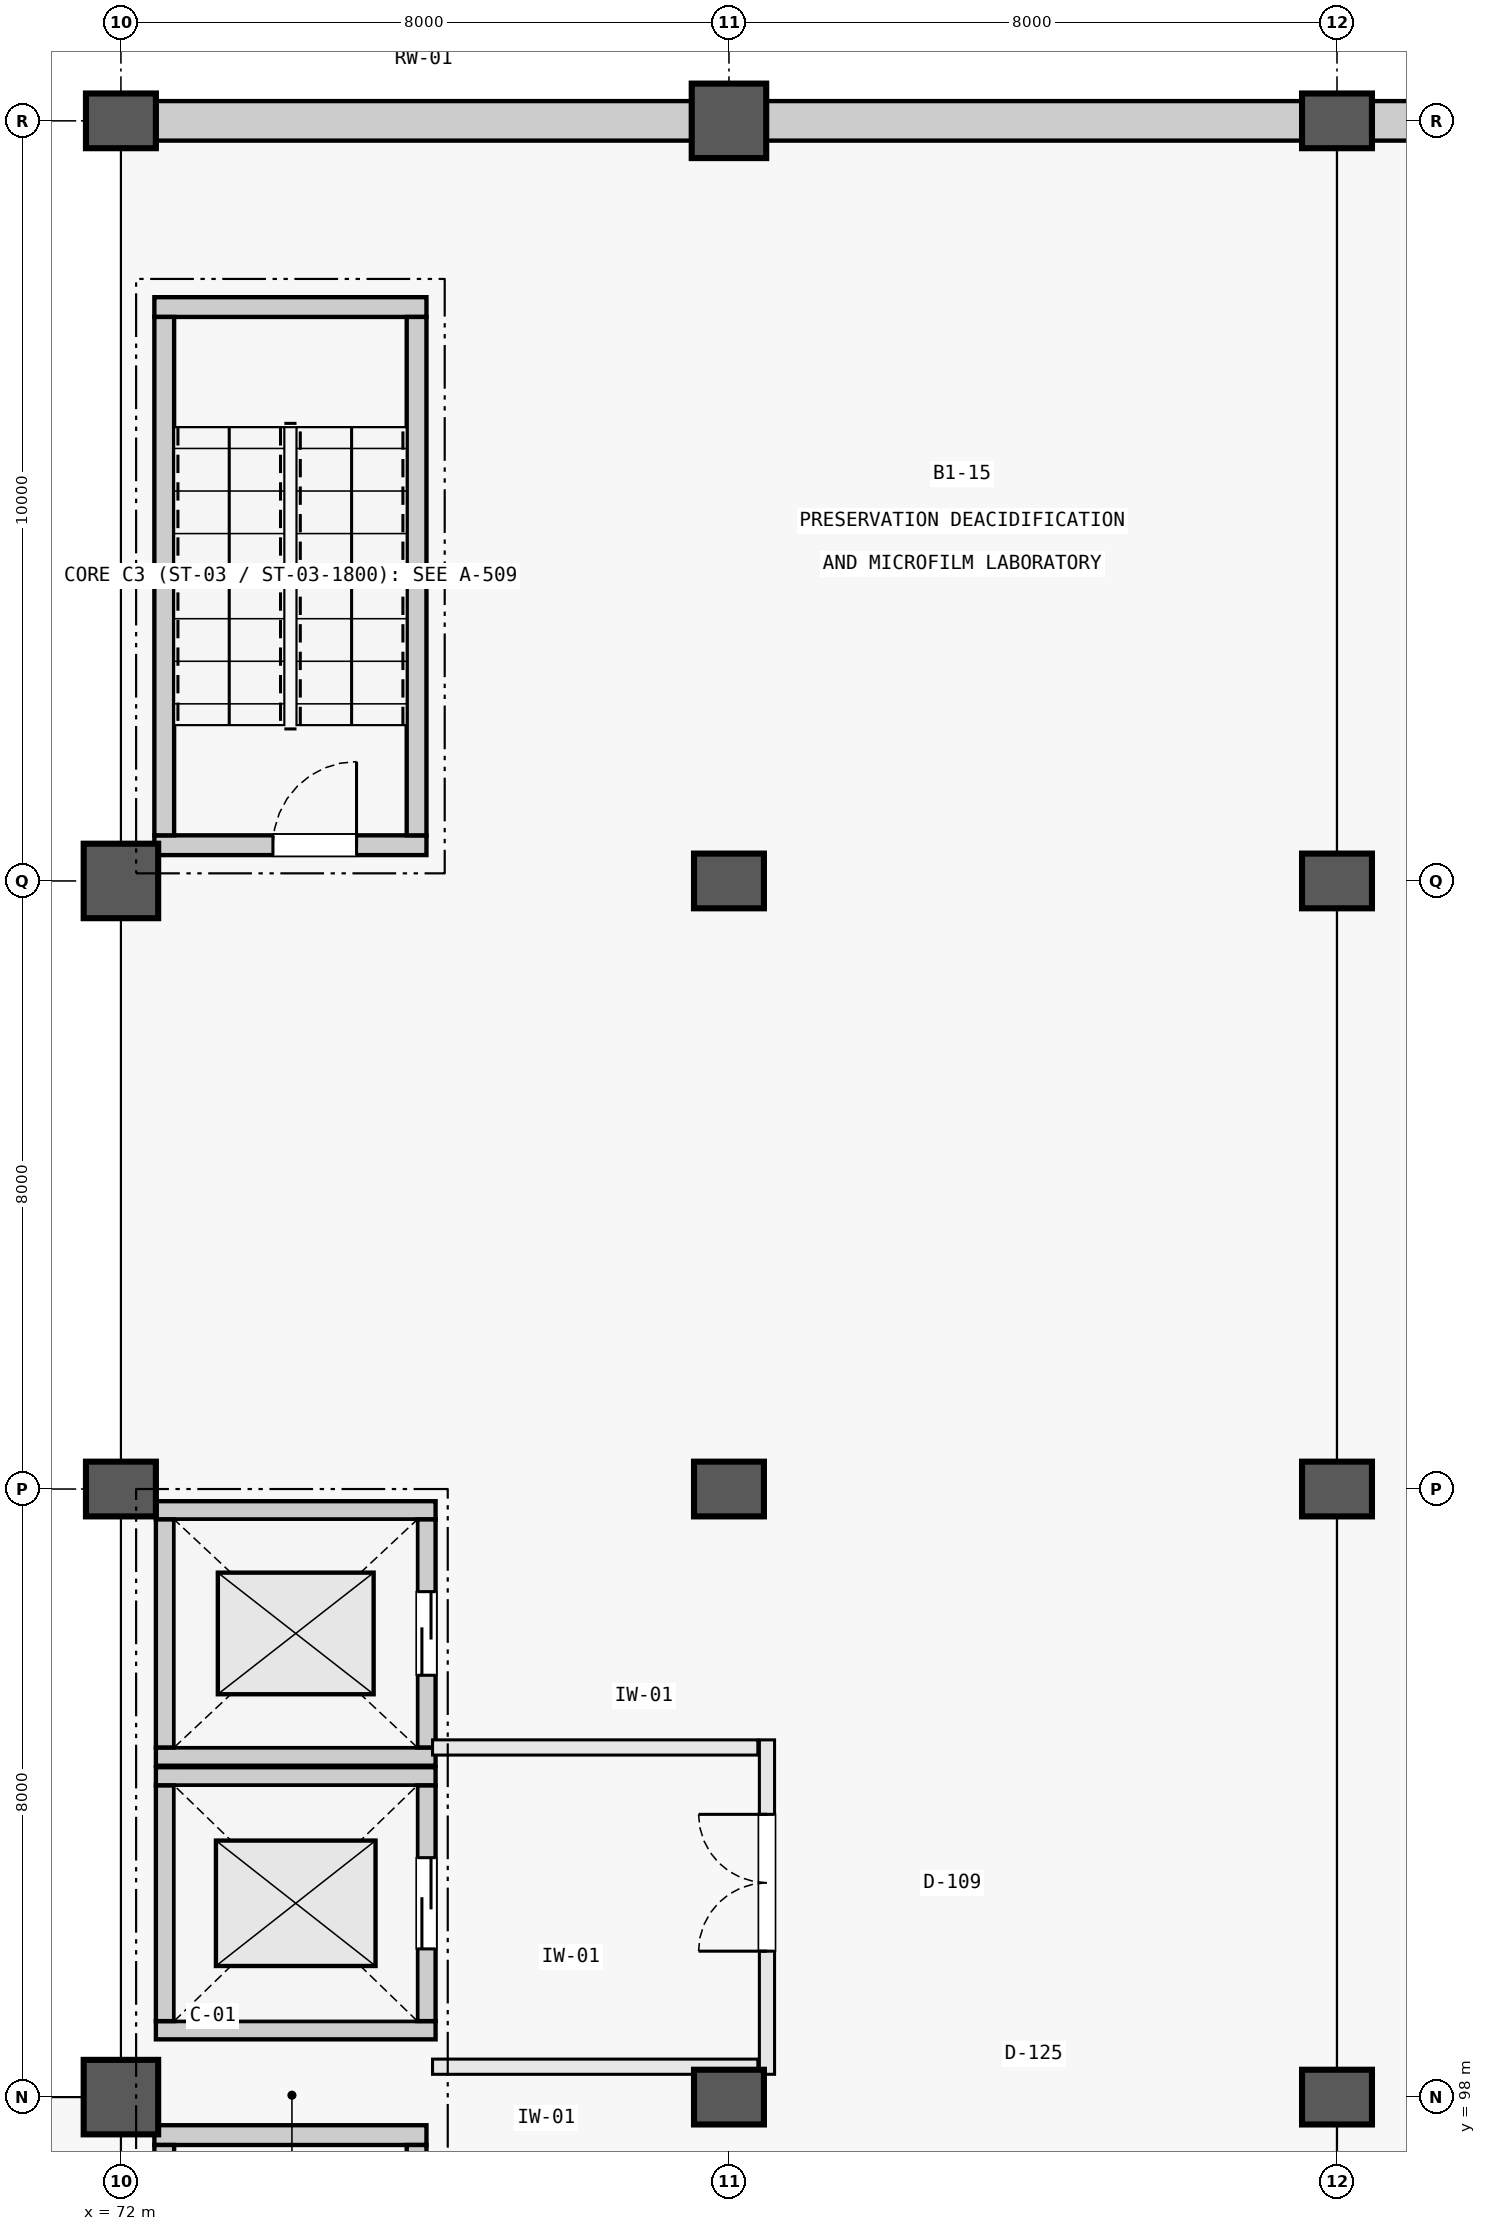
"""IFC4 building model, lengths in metres.
Left out: names, types, materials, properties, quantities, classifications, styles, units other than length and angle.
Written with IfcOpenShell. Run it as: python <this file> out.ifc"""

import sys

from ifc_helpers import new_model, si_unit, direction, frame, frame_2d, origin, origin_2d, place, context, subcontext, project, spatial, rectangle, extrude, element, fill, save


model = new_model("IFC4")
c1 = context("Model", 3, precision=1e-05, world=origin(), true_north=direction((0.0, 1.0)))
c2 = subcontext(c1, "Body", "Model", "MODEL_VIEW")
j1 = project(units=[si_unit("LENGTHUNIT", "METRE"), si_unit("PLANEANGLEUNIT", "RADIAN")], contexts=[c1])
p1 = place(None, origin())
s1 = spatial("IfcSite", under=j1, at=p1, CompositionType="ELEMENT")
p2 = place(p1, origin())
s2 = spatial("IfcBuilding", under=s1, at=p2, CompositionType="ELEMENT")
p3 = place(p2, frame((0.0, 0.0, -5.4)))
s3 = spatial("IfcBuildingStorey", under=s2, at=p3, CompositionType="ELEMENT", Elevation=-5.4)
p4 = place(p3, frame((72.0, 98.0, 0.0), z_axis=(0.0, 0.0, 1.0), x_axis=(1.0, 0.0, 0.0)))
e1 = element("IfcColumn", 1, at=p4, inside=s3, PredefinedType="COLUMN", context=c2, shape_type="SweptSolid", body=[
    extrude(rectangle(XDim=0.98, YDim=0.98, at=origin_2d()), origin(), (0.0, 0.0, 1.0), 5.4),
])
p5 = place(p3, frame((72.0, 106.0, 0.0), z_axis=(0.0, 0.0, 1.0), x_axis=(1.0, 0.0, 0.0)))
e2 = element("IfcColumn", 2, at=p5, inside=s3, PredefinedType="COLUMN", context=c2, shape_type="SweptSolid", body=[
    extrude(rectangle(XDim=0.92, YDim=0.72, at=origin_2d()), origin(), (0.0, 0.0, 1.0), 5.4),
])
p6 = place(p3, frame((72.0, 114.0, 0.0), z_axis=(0.0, 0.0, 1.0), x_axis=(1.0, 0.0, 0.0)))
e3 = element("IfcColumn", 3, at=p6, inside=s3, PredefinedType="COLUMN", context=c2, shape_type="SweptSolid", body=[
    extrude(rectangle(XDim=0.98, YDim=0.98, at=origin_2d()), origin(), (0.0, 0.0, 1.0), 5.4),
])
for number, where, z_axis, x_axis in (
    (4, (72.0, 124.0, 0.0), (0.0, 0.0, 1.0), (1.0, 0.0, 0.0)),
    (5, (80.0, 98.0, 0.0), (0.0, 0.0, 1.0), (1.0, 0.0, 0.0)),
    (6, (80.0, 106.0, 0.0), (0.0, 0.0, 1.0), (1.0, 0.0, 0.0)),
    (7, (80.0, 114.0, 0.0), (0.0, 0.0, 1.0), (1.0, 0.0, 0.0)),
):
    element("IfcColumn", number, at=place(p3, frame(where, z_axis=z_axis, x_axis=x_axis)), inside=s3, PredefinedType="COLUMN", context=c2, shape_type="SweptSolid", body=[
        extrude(rectangle(XDim=0.92, YDim=0.72, at=origin_2d()), origin(), (0.0, 0.0, 1.0), 5.4),
    ])
p7 = place(p3, frame((80.0, 124.0, 0.0), z_axis=(0.0, 0.0, 1.0), x_axis=(1.0, 0.0, 0.0)))
e8 = element("IfcColumn", 8, at=p7, inside=s3, PredefinedType="COLUMN", context=c2, shape_type="SweptSolid", body=[
    extrude(rectangle(XDim=0.98, YDim=0.98, at=origin_2d()), origin(), (0.0, 0.0, 1.0), 5.4),
])
for number, where, z_axis, x_axis in (
    (9, (88.0, 98.0, 0.0), (0.0, 0.0, 1.0), (1.0, 0.0, 0.0)),
    (10, (88.0, 106.0, 0.0), (0.0, 0.0, 1.0), (1.0, 0.0, 0.0)),
    (11, (88.0, 114.0, 0.0), (0.0, 0.0, 1.0), (1.0, 0.0, 0.0)),
    (12, (88.0, 124.0, 0.0), (0.0, 0.0, 1.0), (1.0, 0.0, 0.0)),
):
    element("IfcColumn", number, at=place(p3, frame(where, z_axis=z_axis, x_axis=x_axis)), inside=s3, PredefinedType="COLUMN", context=c2, shape_type="SweptSolid", body=[
        extrude(rectangle(XDim=0.92, YDim=0.72, at=origin_2d()), origin(), (0.0, 0.0, 1.0), 5.4),
    ])
for number, where, z_axis, x_axis in (
    (13, (72.46, 124.0, 0.0), (0.0, 0.0, 1.0), (1.0, 0.0, 0.0)),
    (14, (80.49, 124.0, 0.0), (0.0, 0.0, 1.0), (1.0, 0.0, 0.0)),
    (15, (88.46, 124.0, 0.0), (0.0, 0.0, 1.0), (1.0, 0.0, 0.0)),
):
    element("IfcWall", number, at=place(p3, frame(where, z_axis=z_axis, x_axis=x_axis)), inside=s3, PredefinedType="USERDEFINED", context=c2, shape_type="SweptSolid", body=[
        extrude(rectangle(XDim=7.05, YDim=0.52, at=frame_2d((3.525, 0.0))), origin(), (0.0, 0.0, 1.0), 4.98),
    ])
p8 = place(p3, frame((72.44, 97.5, 0.0), z_axis=(0.0, 0.0, 1.0), x_axis=(1.0, 0.0, 0.0)))
e16 = element("IfcWall", 16, at=p8, inside=s3, PredefinedType="SOLIDWALL", context=c2, shape_type="SweptSolid", body=[
    extrude(rectangle(XDim=3.58, YDim=0.26, at=frame_2d((1.79, 0.0))), origin(), (0.0, 0.0, 1.0), 5.4),
])
for number, where, z_axis, x_axis in (
    (17, (72.57, 90.55, 0.0), (0.0, 0.0, 1.0), (0.0, 1.0, 0.0)),
    (18, (75.89, 90.55, 0.0), (0.0, 0.0, 1.0), (0.0, 1.0, 0.0)),
):
    element("IfcWall", number, at=place(p3, frame(where, z_axis=z_axis, x_axis=x_axis)), inside=s3, PredefinedType="SOLIDWALL", context=c2, shape_type="SweptSolid", body=[
        extrude(rectangle(XDim=6.82, YDim=0.26, at=frame_2d((3.41, 0.0))), origin(), (0.0, 0.0, 1.0), 5.4),
    ])
p9 = place(p3, frame((72.44, 114.47, 0.0), z_axis=(0.0, 0.0, 1.0), x_axis=(1.0, 0.0, 0.0)))
e19 = element("IfcWall", 19, at=p9, inside=s3, PredefinedType="SOLIDWALL", context=c2, shape_type="SweptSolid", body=[
    extrude(rectangle(XDim=3.58, YDim=0.26, at=frame_2d((1.79, 0.0))), origin(), (0.0, 0.0, 1.0), 5.4),
])
p10 = place(p9, frame((1.56, 0.0, 0.0)))
e20 = element("IfcOpeningElement", 20, at=p10, cuts=e19, PredefinedType="OPENING", context=c2, shape_type="SweptSolid", body=[
    extrude(rectangle(XDim=1.1, YDim=2.2, at=frame_2d((0.55, 1.1))), frame((0.0, 0.142, 0.0), z_axis=(0.0, -1.0, 0.0), x_axis=(1.0, 0.0, 0.0)), (0.0, 0.0, 1.0), 0.284),
])
p11 = place(p3, frame((72.44, 121.55, 0.0), z_axis=(0.0, 0.0, 1.0), x_axis=(1.0, 0.0, 0.0)))
e21 = element("IfcWall", 21, at=p11, inside=s3, PredefinedType="SOLIDWALL", context=c2, shape_type="SweptSolid", body=[
    extrude(rectangle(XDim=3.58, YDim=0.26, at=frame_2d((1.79, 0.0))), origin(), (0.0, 0.0, 1.0), 5.4),
])
for number, where, z_axis, x_axis in (
    (22, (72.57, 114.6, 0.0), (0.0, 0.0, 1.0), (0.0, 1.0, 0.0)),
    (23, (75.89, 114.6, 0.0), (0.0, 0.0, 1.0), (0.0, 1.0, 0.0)),
):
    element("IfcWall", number, at=place(p3, frame(where, z_axis=z_axis, x_axis=x_axis)), inside=s3, PredefinedType="SOLIDWALL", context=c2, shape_type="SweptSolid", body=[
        extrude(rectangle(XDim=6.82, YDim=0.26, at=frame_2d((3.41, 0.0))), origin(), (0.0, 0.0, 1.0), 5.4),
    ])
for number, where, z_axis, x_axis in (
    (24, (72.46, 98.88, 0.0), (0.0, 0.0, 1.0), (1.0, 0.0, 0.0)),
    (25, (72.46, 102.22, 0.0), (0.0, 0.0, 1.0), (1.0, 0.0, 0.0)),
):
    element("IfcWall", number, at=place(p3, frame(where, z_axis=z_axis, x_axis=x_axis)), inside=s3, PredefinedType="SOLIDWALL", context=c2, shape_type="SweptSolid", body=[
        extrude(rectangle(XDim=3.68, YDim=0.24, at=frame_2d((1.84, 0.0))), origin(), (0.0, 0.0, 1.0), 5.4),
    ])
p12 = place(p3, frame((72.58, 99.0, 0.0), z_axis=(0.0, 0.0, 1.0), x_axis=(0.0, 1.0, 0.0)))
e26 = element("IfcWall", 26, at=p12, inside=s3, PredefinedType="SOLIDWALL", context=c2, shape_type="SweptSolid", body=[
    extrude(rectangle(XDim=3.1, YDim=0.24, at=frame_2d((1.55, 0.0))), origin(), (0.0, 0.0, 1.0), 5.4),
])
p13 = place(p3, frame((76.02, 99.0, 0.0), z_axis=(0.0, 0.0, 1.0), x_axis=(0.0, 1.0, 0.0)))
e27 = element("IfcWall", 27, at=p13, inside=s3, PredefinedType="SOLIDWALL", context=c2, shape_type="SweptSolid", body=[
    extrude(rectangle(XDim=3.1, YDim=0.24, at=frame_2d((1.55, 0.0))), origin(), (0.0, 0.0, 1.0), 5.4),
])
p14 = place(p13, frame((0.95, 0.0, 0.0)))
e28 = element("IfcOpeningElement", 28, at=p14, cuts=e27, PredefinedType="OPENING", context=c2, shape_type="SweptSolid", body=[
    extrude(rectangle(XDim=1.2, YDim=2.2, at=frame_2d((0.6, 1.1))), frame((0.0, 0.132, 0.0), z_axis=(0.0, -1.0, 0.0), x_axis=(1.0, 0.0, 0.0)), (0.0, 0.0, 1.0), 0.264),
])
for number, where, z_axis, x_axis in (
    (29, (72.46, 102.48, 0.0), (0.0, 0.0, 1.0), (1.0, 0.0, 0.0)),
    (30, (72.46, 105.72, 0.0), (0.0, 0.0, 1.0), (1.0, 0.0, 0.0)),
):
    element("IfcWall", number, at=place(p3, frame(where, z_axis=z_axis, x_axis=x_axis)), inside=s3, PredefinedType="SOLIDWALL", context=c2, shape_type="SweptSolid", body=[
        extrude(rectangle(XDim=3.68, YDim=0.24, at=frame_2d((1.84, 0.0))), origin(), (0.0, 0.0, 1.0), 5.4),
    ])
p15 = place(p3, frame((72.58, 102.6, 0.0), z_axis=(0.0, 0.0, 1.0), x_axis=(0.0, 1.0, 0.0)))
e31 = element("IfcWall", 31, at=p15, inside=s3, PredefinedType="SOLIDWALL", context=c2, shape_type="SweptSolid", body=[
    extrude(rectangle(XDim=3.0, YDim=0.24, at=frame_2d((1.5, 0.0))), origin(), (0.0, 0.0, 1.0), 5.4),
])
p16 = place(p3, frame((76.02, 102.6, 0.0), z_axis=(0.0, 0.0, 1.0), x_axis=(0.0, 1.0, 0.0)))
e32 = element("IfcWall", 32, at=p16, inside=s3, PredefinedType="SOLIDWALL", context=c2, shape_type="SweptSolid", body=[
    extrude(rectangle(XDim=3.0, YDim=0.24, at=frame_2d((1.5, 0.0))), origin(), (0.0, 0.0, 1.0), 5.4),
])
p17 = place(p16, frame((0.95, 0.0, 0.0)))
e33 = element("IfcOpeningElement", 33, at=p17, cuts=e32, PredefinedType="OPENING", context=c2, shape_type="SweptSolid", body=[
    extrude(rectangle(XDim=1.1, YDim=2.2, at=frame_2d((0.55, 1.1))), frame((0.0, 0.132, 0.0), z_axis=(0.0, -1.0, 0.0), x_axis=(1.0, 0.0, 0.0)), (0.0, 0.0, 1.0), 0.264),
])
for number, where, z_axis, x_axis in (
    (34, (76.1, 98.4, 0.0), (0.0, 0.0, 1.0), (1.0, 0.0, 0.0)),
    (35, (76.1, 102.6, 0.0), (0.0, 0.0, 1.0), (1.0, 0.0, 0.0)),
):
    element("IfcWall", number, at=place(p3, frame(where, z_axis=z_axis, x_axis=x_axis)), inside=s3, PredefinedType="PARTITIONING", context=c2, shape_type="SweptSolid", body=[
        extrude(rectangle(XDim=4.28, YDim=0.2, at=frame_2d((2.14, 0.0))), origin(), (0.0, 0.0, 1.0), 4.0),
    ])
p18 = place(p3, frame((80.5, 98.3, 0.0), z_axis=(0.0, 0.0, 1.0), x_axis=(0.0, 1.0, 0.0)))
e36 = element("IfcWall", 36, at=p18, inside=s3, PredefinedType="PARTITIONING", context=c2, shape_type="SweptSolid", body=[
    extrude(rectangle(XDim=4.4, YDim=0.2, at=frame_2d((2.2, 0.0))), origin(), (0.0, 0.0, 1.0), 4.0),
])
p19 = place(p18, frame((1.62, 0.0, 0.0)))
e37 = element("IfcOpeningElement", 37, at=p19, cuts=e36, PredefinedType="OPENING", context=c2, shape_type="SweptSolid", body=[
    extrude(rectangle(XDim=1.8, YDim=2.25, at=frame_2d((0.9, 1.125))), frame((0.0, 0.112, 0.0), z_axis=(0.0, -1.0, 0.0), x_axis=(1.0, 0.0, 0.0)), (0.0, 0.0, 1.0), 0.224),
])
p20 = place(p10, origin())
e38 = element("IfcDoor", 38, at=p20, inside=s3, OperationType="SINGLE_SWING_RIGHT", PredefinedType="DOOR", context=c2, shape_type="SweptSolid", body=[
    extrude(rectangle(XDim=1.1, YDim=2.2, at=frame_2d((0.55, 1.1))), frame((0.0, 0.025, 0.0), z_axis=(0.0, -1.0, 0.0), x_axis=(1.0, 0.0, 0.0)), (0.0, 0.0, 1.0), 0.05),
])
fill(e20, e38)
p21 = place(p14, origin())
e39 = element("IfcDoor", 39, at=p21, inside=s3, OperationType="DOUBLE_DOOR_SLIDING", PredefinedType="DOOR", context=c2, shape_type="SweptSolid", body=[
    extrude(rectangle(XDim=1.2, YDim=2.2, at=frame_2d((0.6, 1.1))), frame((0.0, 0.025, 0.0), z_axis=(0.0, -1.0, 0.0), x_axis=(1.0, 0.0, 0.0)), (0.0, 0.0, 1.0), 0.05),
])
fill(e28, e39)
p22 = place(p17, origin())
e40 = element("IfcDoor", 40, at=p22, inside=s3, OperationType="DOUBLE_DOOR_SLIDING", PredefinedType="DOOR", context=c2, shape_type="SweptSolid", body=[
    extrude(rectangle(XDim=1.1, YDim=2.2, at=frame_2d((0.55, 1.1))), frame((0.0, 0.025, 0.0), z_axis=(0.0, -1.0, 0.0), x_axis=(1.0, 0.0, 0.0)), (0.0, 0.0, 1.0), 0.05),
])
fill(e33, e40)
p23 = place(p19, origin())
e41 = element("IfcDoor", 41, at=p23, inside=s3, OperationType="DOUBLE_DOOR_SINGLE_SWING", PredefinedType="DOOR", context=c2, shape_type="SweptSolid", body=[
    extrude(rectangle(XDim=1.8, YDim=2.25, at=frame_2d((0.9, 1.125))), frame((0.0, 0.025, 0.0), z_axis=(0.0, -1.0, 0.0), x_axis=(1.0, 0.0, 0.0)), (0.0, 0.0, 1.0), 0.05),
])
fill(e37, e41)
save(model, sys.argv[1])
